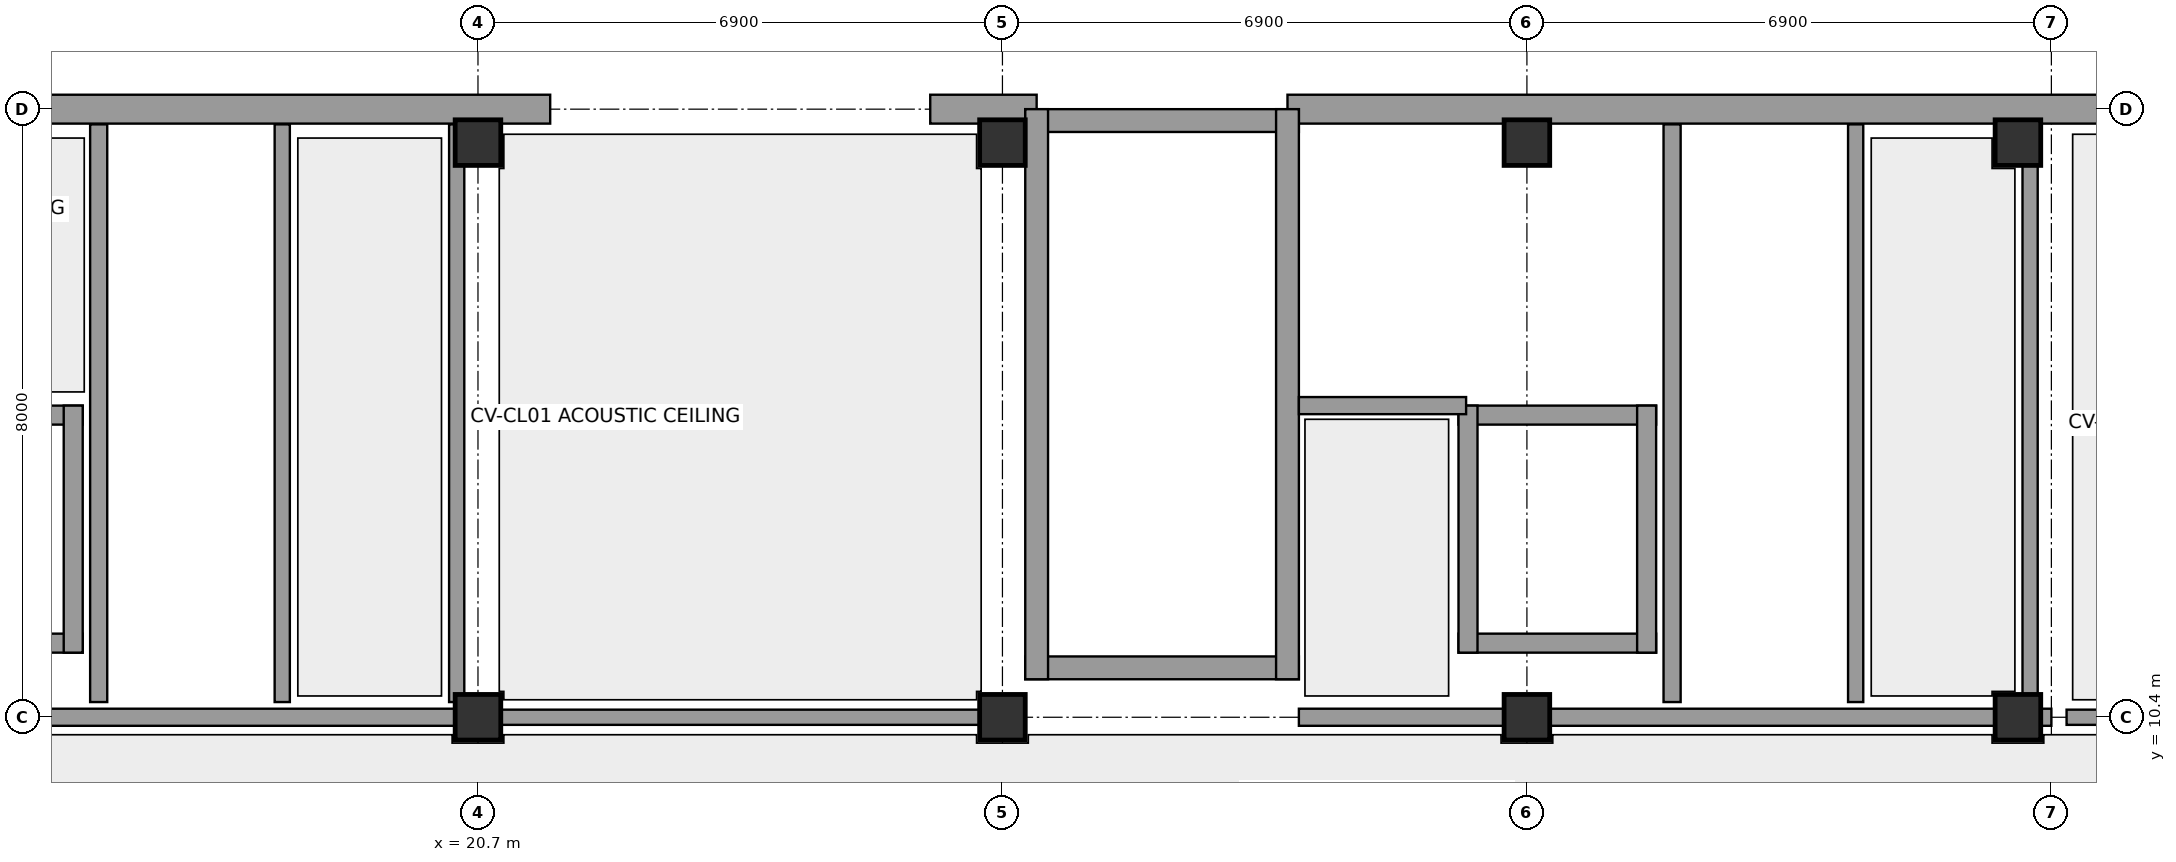
"""IFC4 building model, lengths in metres.
Left out: names, types, materials, properties, quantities, classifications, styles, units other than length and angle.
Written with IfcOpenShell. Run it as: python <this file> out.ifc"""

import sys

from ifc_helpers import new_model, si_unit, direction, frame, frame_2d, origin, origin_with_axes, origin_2d, place, context, subcontext, project, spatial, rectangle, extrude, element, fill, save


model = new_model("IFC4")
c1 = context("Model", 3, precision=1e-05, world=origin(), true_north=direction((0.0, 1.0)))
c2 = subcontext(c1, "Body", "Model", "MODEL_VIEW")
j1 = project(units=[si_unit("LENGTHUNIT", "METRE"), si_unit("PLANEANGLEUNIT", "RADIAN")], contexts=[c1])
p1 = place(None, origin())
s1 = spatial("IfcSite", under=j1, at=p1, CompositionType="ELEMENT")
p2 = place(p1, origin())
s2 = spatial("IfcBuilding", under=s1, at=p2, CompositionType="ELEMENT")
p3 = place(p2, origin())
s3 = spatial("IfcBuildingStorey", under=s2, at=p3, CompositionType="ELEMENT", Elevation=0.0)
for number, where, z_axis, x_axis in (
    (1, (20.7, 10.4, 0.0), (0.0, 0.0, 1.0), (1.0, 0.0, 0.0)),
    (2, (20.7, 17.96, 0.0), (0.0, 0.0, 1.0), (1.0, 0.0, 0.0)),
    (3, (27.6, 10.4, 0.0), (0.0, 0.0, 1.0), (1.0, 0.0, 0.0)),
    (4, (27.6, 17.96, 0.0), (0.0, 0.0, 1.0), (1.0, 0.0, 0.0)),
    (5, (34.5, 10.4, 0.0), (0.0, 0.0, 1.0), (1.0, 0.0, 0.0)),
    (6, (34.5, 17.96, 0.0), (0.0, 0.0, 1.0), (1.0, 0.0, 0.0)),
    (7, (40.96, 10.4, 0.0), (0.0, 0.0, 1.0), (1.0, 0.0, 0.0)),
    (8, (40.96, 17.96, 0.0), (0.0, 0.0, 1.0), (1.0, 0.0, 0.0)),
):
    element("IfcColumn", number, at=place(p3, frame(where, z_axis=z_axis, x_axis=x_axis)), inside=s3, PredefinedType="COLUMN", context=c2, shape_type="SweptSolid", body=[
        extrude(rectangle(XDim=0.6, YDim=0.6, at=origin_2d()), origin(), (0.0, 0.0, 1.0), 4.4),
    ])
p4 = place(p3, frame((10.65, 18.4, 0.0), z_axis=(0.0, 0.0, 1.0), x_axis=(1.0, 0.0, 0.0)))
e9 = element("IfcWall", 9, at=p4, inside=s3, PredefinedType="STANDARD", context=c2, shape_type="SweptSolid", body=[
    extrude(rectangle(XDim=11.0, YDim=0.38, at=frame_2d((5.5, 0.0))), origin(), (0.0, 0.0, 1.0), 4.12),
])
p5 = place(p3, frame((26.65, 18.4, 0.0), z_axis=(0.0, 0.0, 1.0), x_axis=(1.0, 0.0, 0.0)))
e10 = element("IfcWall", 10, at=p5, inside=s3, PredefinedType="STANDARD", context=c2, shape_type="SweptSolid", body=[
    extrude(rectangle(XDim=1.4, YDim=0.38, at=frame_2d((0.7, 0.0))), origin(), (0.0, 0.0, 1.0), 4.12),
])
p6 = place(p3, frame((31.35, 18.4, 0.0), z_axis=(0.0, 0.0, 1.0), x_axis=(1.0, 0.0, 0.0)))
e11 = element("IfcWall", 11, at=p6, inside=s3, PredefinedType="STANDARD", context=c2, shape_type="SweptSolid", body=[
    extrude(rectangle(XDim=11.0, YDim=0.38, at=frame_2d((5.5, 0.0))), origin(), (0.0, 0.0, 1.0), 4.12),
])
p7 = place(p3, frame((12.9, 14.375, 0.0), z_axis=(0.0, 0.0, 1.0), x_axis=(1.0, 0.0, 0.0)))
e12 = element("IfcWall", 12, at=p7, inside=s3, PredefinedType="SHEAR", context=c2, shape_type="SweptSolid", body=[
    extrude(rectangle(XDim=2.6, YDim=0.25, at=frame_2d((1.3, 0.0))), origin(), (0.0, 0.0, 1.0), 4.12),
])
p8 = place(p7, frame((0.875, 0.0, 0.0)))
e13 = element("IfcOpeningElement", 13, at=p8, cuts=e12, PredefinedType="OPENING", context=c2, shape_type="SweptSolid", body=[
    extrude(rectangle(XDim=1.1, YDim=2.1, at=frame_2d((0.55, 1.05))), frame((0.0, 0.137, 0.0), z_axis=(0.0, -1.0, 0.0), x_axis=(1.0, 0.0, 0.0)), (0.0, 0.0, 1.0), 0.274),
])
p9 = place(p3, frame((12.9, 11.375, 0.0), z_axis=(0.0, 0.0, 1.0), x_axis=(1.0, 0.0, 0.0)))
e14 = element("IfcWall", 14, at=p9, inside=s3, PredefinedType="SHEAR", context=c2, shape_type="SweptSolid", body=[
    extrude(rectangle(XDim=2.6, YDim=0.25, at=frame_2d((1.3, 0.0))), origin(), (0.0, 0.0, 1.0), 4.12),
])
p10 = place(p3, frame((15.375, 11.25, 0.0), z_axis=(0.0, 0.0, 1.0), x_axis=(0.0, 1.0, 0.0)))
e15 = element("IfcWall", 15, at=p10, inside=s3, PredefinedType="SHEAR", context=c2, shape_type="SweptSolid", body=[
    extrude(rectangle(XDim=3.25, YDim=0.25, at=frame_2d((1.625, 0.0))), origin(), (0.0, 0.0, 1.0), 4.12),
])
p11 = place(p3, frame((15.71, 10.6, 0.0), z_axis=(0.0, 0.0, 1.0), x_axis=(0.0, 1.0, 0.0)))
e16 = element("IfcWall", 16, at=p11, inside=s3, PredefinedType="PARTITIONING", context=c2, shape_type="SweptSolid", body=[
    extrude(rectangle(XDim=7.6, YDim=0.225, at=frame_2d((3.8, 0.0))), origin(), (0.0, 0.0, 1.0), 3.79),
])
p12 = place(p3, frame((18.125, 10.6, 0.0), z_axis=(0.0, 0.0, 1.0), x_axis=(0.0, 1.0, 0.0)))
e17 = element("IfcWall", 17, at=p12, inside=s3, PredefinedType="PARTITIONING", context=c2, shape_type="SweptSolid", body=[
    extrude(rectangle(XDim=7.6, YDim=0.2, at=frame_2d((3.8, 0.0))), origin(), (0.0, 0.0, 1.0), 3.79),
])
p13 = place(p3, frame((20.42, 10.6, 0.0), z_axis=(0.0, 0.0, 1.0), x_axis=(0.0, 1.0, 0.0)))
e18 = element("IfcWall", 18, at=p13, inside=s3, PredefinedType="PARTITIONING", context=c2, shape_type="SweptSolid", body=[
    extrude(rectangle(XDim=7.6, YDim=0.2, at=frame_2d((3.8, 0.0))), origin(), (0.0, 0.0, 1.0), 4.12),
])
p14 = place(p3, frame((10.8, 10.4, 0.0), z_axis=(0.0, 0.0, 1.0), x_axis=(1.0, 0.0, 0.0)))
e19 = element("IfcWall", 19, at=p14, inside=s3, PredefinedType="PARTITIONING", context=c2, shape_type="SweptSolid", body=[
    extrude(rectangle(XDim=9.9, YDim=0.225, at=frame_2d((4.95, 0.0))), origin(), (0.0, 0.0, 1.0), 3.56),
])
p15 = place(p14, frame((0.475, 0.0, 0.0)))
e20 = element("IfcOpeningElement", 20, at=p15, cuts=e19, PredefinedType="OPENING", context=c2, shape_type="SweptSolid", body=[
    extrude(rectangle(XDim=1.1, YDim=2.15, at=frame_2d((0.55, 1.075))), frame((0.0, 0.125, 0.0), z_axis=(0.0, -1.0, 0.0), x_axis=(1.0, 0.0, 0.0)), (0.0, 0.0, 1.0), 0.249),
])
p16 = place(p14, frame((5.75, 0.0, 0.0)))
e21 = element("IfcOpeningElement", 21, at=p16, cuts=e19, PredefinedType="OPENING", context=c2, shape_type="SweptSolid", body=[
    extrude(rectangle(XDim=0.9, YDim=2.1, at=frame_2d((0.45, 1.05))), frame((0.0, 0.125, 0.0), z_axis=(0.0, -1.0, 0.0), x_axis=(1.0, 0.0, 0.0)), (0.0, 0.0, 1.0), 0.249),
])
p17 = place(p14, frame((7.8, 0.0, 0.0)))
e22 = element("IfcOpeningElement", 22, at=p17, cuts=e19, PredefinedType="OPENING", context=c2, shape_type="SweptSolid", body=[
    extrude(rectangle(XDim=0.95, YDim=2.15, at=frame_2d((0.475, 1.075))), frame((0.0, 0.125, 0.0), z_axis=(0.0, -1.0, 0.0), x_axis=(1.0, 0.0, 0.0)), (0.0, 0.0, 1.0), 0.249),
])
p18 = place(p3, frame((27.9, 18.25, 0.0), z_axis=(0.0, 0.0, 1.0), x_axis=(1.0, 0.0, 0.0)))
e23 = element("IfcWall", 23, at=p18, inside=s3, PredefinedType="SHEAR", context=c2, shape_type="SweptSolid", body=[
    extrude(rectangle(XDim=3.6, YDim=0.3, at=frame_2d((1.8, 0.0))), origin(), (0.0, 0.0, 1.0), 4.12),
])
p19 = place(p18, frame((1.1, 0.0, 0.0)))
e24 = element("IfcOpeningElement", 24, at=p19, cuts=e23, PredefinedType="OPENING", context=c2, shape_type="SweptSolid", body=[
    extrude(rectangle(XDim=1.4, YDim=2.25, at=frame_2d((0.7, 1.125))), frame((0.0, 0.162, 0.0), z_axis=(0.0, -1.0, 0.0), x_axis=(1.0, 0.0, 0.0)), (0.0, 0.0, 1.0), 0.324),
])
p20 = place(p3, frame((27.9, 11.05, 0.0), z_axis=(0.0, 0.0, 1.0), x_axis=(1.0, 0.0, 0.0)))
e25 = element("IfcWall", 25, at=p20, inside=s3, PredefinedType="SHEAR", context=c2, shape_type="SweptSolid", body=[
    extrude(rectangle(XDim=3.6, YDim=0.3, at=frame_2d((1.8, 0.0))), origin(), (0.0, 0.0, 1.0), 4.12),
])
p21 = place(p3, frame((28.05, 10.9, 0.0), z_axis=(0.0, 0.0, 1.0), x_axis=(0.0, 1.0, 0.0)))
e26 = element("IfcWall", 26, at=p21, inside=s3, PredefinedType="SHEAR", context=c2, shape_type="SweptSolid", body=[
    extrude(rectangle(XDim=7.5, YDim=0.3, at=frame_2d((3.75, 0.0))), origin(), (0.0, 0.0, 1.0), 4.12),
])
p22 = place(p3, frame((31.35, 10.9, 0.0), z_axis=(0.0, 0.0, 1.0), x_axis=(0.0, 1.0, 0.0)))
e27 = element("IfcWall", 27, at=p22, inside=s3, PredefinedType="SHEAR", context=c2, shape_type="SweptSolid", body=[
    extrude(rectangle(XDim=7.5, YDim=0.3, at=frame_2d((3.75, 0.0))), origin(), (0.0, 0.0, 1.0), 4.12),
])
p23 = place(p22, frame((5.7, 0.0, 0.0)))
e28 = element("IfcOpeningElement", 28, at=p23, cuts=e27, PredefinedType="OPENING", context=c2, shape_type="SweptSolid", body=[
    extrude(rectangle(XDim=1.15, YDim=2.15, at=frame_2d((0.575, 1.075))), frame((0.0, 0.162, 0.0), z_axis=(0.0, -1.0, 0.0), x_axis=(1.0, 0.0, 0.0)), (0.0, 0.0, 1.0), 0.324),
])
p24 = place(p3, frame((33.6, 14.375, 0.0), z_axis=(0.0, 0.0, 1.0), x_axis=(1.0, 0.0, 0.0)))
e29 = element("IfcWall", 29, at=p24, inside=s3, PredefinedType="SHEAR", context=c2, shape_type="SweptSolid", body=[
    extrude(rectangle(XDim=2.6, YDim=0.25, at=frame_2d((1.3, 0.0))), origin(), (0.0, 0.0, 1.0), 4.12),
])
p25 = place(p24, frame((0.925, 0.0, 0.0)))
e30 = element("IfcOpeningElement", 30, at=p25, cuts=e29, PredefinedType="OPENING", context=c2, shape_type="SweptSolid", body=[
    extrude(rectangle(XDim=1.0, YDim=2.1, at=frame_2d((0.5, 1.05))), frame((0.0, 0.137, 0.0), z_axis=(0.0, -1.0, 0.0), x_axis=(1.0, 0.0, 0.0)), (0.0, 0.0, 1.0), 0.274),
])
p26 = place(p3, frame((33.6, 11.375, 0.0), z_axis=(0.0, 0.0, 1.0), x_axis=(1.0, 0.0, 0.0)))
e31 = element("IfcWall", 31, at=p26, inside=s3, PredefinedType="SHEAR", context=c2, shape_type="SweptSolid", body=[
    extrude(rectangle(XDim=2.6, YDim=0.25, at=frame_2d((1.3, 0.0))), origin(), (0.0, 0.0, 1.0), 4.12),
])
for number, where, z_axis, x_axis in (
    (32, (33.725, 11.25, 0.0), (0.0, 0.0, 1.0), (0.0, 1.0, 0.0)),
    (33, (36.075, 11.25, 0.0), (0.0, 0.0, 1.0), (0.0, 1.0, 0.0)),
):
    element("IfcWall", number, at=place(p3, frame(where, z_axis=z_axis, x_axis=x_axis)), inside=s3, PredefinedType="SHEAR", context=c2, shape_type="SweptSolid", body=[
        extrude(rectangle(XDim=3.25, YDim=0.25, at=frame_2d((1.625, 0.0))), origin(), (0.0, 0.0, 1.0), 4.12),
    ])
p27 = place(p3, frame((36.41, 10.6, 0.0), z_axis=(0.0, 0.0, 1.0), x_axis=(0.0, 1.0, 0.0)))
e34 = element("IfcWall", 34, at=p27, inside=s3, PredefinedType="PARTITIONING", context=c2, shape_type="SweptSolid", body=[
    extrude(rectangle(XDim=7.6, YDim=0.225, at=frame_2d((3.8, 0.0))), origin(), (0.0, 0.0, 1.0), 4.12),
])
p28 = place(p3, frame((31.5, 14.5, 0.0), z_axis=(0.0, 0.0, 1.0), x_axis=(1.0, 0.0, 0.0)))
e35 = element("IfcWall", 35, at=p28, inside=s3, PredefinedType="PARTITIONING", context=c2, shape_type="SweptSolid", body=[
    extrude(rectangle(XDim=2.2, YDim=0.225, at=frame_2d((1.1, 0.0))), origin(), (0.0, 0.0, 1.0), 4.12),
])
p29 = place(p28, frame((0.45, 0.0, 0.0)))
e36 = element("IfcOpeningElement", 36, at=p29, cuts=e35, PredefinedType="OPENING", context=c2, shape_type="SweptSolid", body=[
    extrude(rectangle(XDim=1.1, YDim=2.15, at=frame_2d((0.55, 1.075))), frame((0.0, 0.125, 0.0), z_axis=(0.0, -1.0, 0.0), x_axis=(1.0, 0.0, 0.0)), (0.0, 0.0, 1.0), 0.249),
])
p30 = place(p3, frame((27.6, 10.4, 0.0), z_axis=(0.0, 0.0, 1.0), x_axis=(1.0, 0.0, 0.0)))
e37 = element("IfcWall", 37, at=p30, inside=s3, PredefinedType="PARTITIONING", context=c2, shape_type="SweptSolid", body=[
    extrude(rectangle(XDim=0.3, YDim=0.225, at=frame_2d((0.15, 0.0))), origin(), (0.0, 0.0, 1.0), 4.12),
])
for number, where, z_axis, x_axis in (
    (38, (38.825, 10.6, 0.0), (0.0, 0.0, 1.0), (0.0, 1.0, 0.0)),
    (39, (41.12, 10.6, 0.0), (0.0, 0.0, 1.0), (0.0, 1.0, 0.0)),
):
    element("IfcWall", number, at=place(p3, frame(where, z_axis=z_axis, x_axis=x_axis)), inside=s3, PredefinedType="PARTITIONING", context=c2, shape_type="SweptSolid", body=[
        extrude(rectangle(XDim=7.6, YDim=0.2, at=frame_2d((3.8, 0.0))), origin(), (0.0, 0.0, 1.0), 4.12),
    ])
p31 = place(p3, frame((31.5, 10.4, 0.0), z_axis=(0.0, 0.0, 1.0), x_axis=(1.0, 0.0, 0.0)))
e40 = element("IfcWall", 40, at=p31, inside=s3, PredefinedType="PARTITIONING", context=c2, shape_type="SweptSolid", body=[
    extrude(rectangle(XDim=9.9, YDim=0.225, at=frame_2d((4.95, 0.0))), origin(), (0.0, 0.0, 1.0), 3.56),
])
p32 = place(p31, frame((0.475, 0.0, 0.0)))
e41 = element("IfcOpeningElement", 41, at=p32, cuts=e40, PredefinedType="OPENING", context=c2, shape_type="SweptSolid", body=[
    extrude(rectangle(XDim=1.1, YDim=2.15, at=frame_2d((0.55, 1.075))), frame((0.0, 0.125, 0.0), z_axis=(0.0, -1.0, 0.0), x_axis=(1.0, 0.0, 0.0)), (0.0, 0.0, 1.0), 0.249),
])
p33 = place(p31, frame((5.75, 0.0, 0.0)))
e42 = element("IfcOpeningElement", 42, at=p33, cuts=e40, PredefinedType="OPENING", context=c2, shape_type="SweptSolid", body=[
    extrude(rectangle(XDim=0.9, YDim=2.1, at=frame_2d((0.45, 1.05))), frame((0.0, 0.125, 0.0), z_axis=(0.0, -1.0, 0.0), x_axis=(1.0, 0.0, 0.0)), (0.0, 0.0, 1.0), 0.249),
])
p34 = place(p31, frame((7.8, 0.0, 0.0)))
e43 = element("IfcOpeningElement", 43, at=p34, cuts=e40, PredefinedType="OPENING", context=c2, shape_type="SweptSolid", body=[
    extrude(rectangle(XDim=0.95, YDim=2.15, at=frame_2d((0.475, 1.075))), frame((0.0, 0.125, 0.0), z_axis=(0.0, -1.0, 0.0), x_axis=(1.0, 0.0, 0.0)), (0.0, 0.0, 1.0), 0.249),
])
p35 = place(p3, frame((20.9, 10.4, 0.0), z_axis=(0.0, 0.0, 1.0), x_axis=(1.0, 0.0, 0.0)))
e44 = element("IfcWall", 44, at=p35, inside=s3, PredefinedType="PARTITIONING", context=c2, shape_type="SweptSolid", body=[
    extrude(rectangle(XDim=6.5, YDim=0.2, at=frame_2d((3.25, 0.0))), origin(), (0.0, 0.0, 1.0), 3.56),
])
p36 = place(p35, frame((1.9, 0.0, 0.0)))
e45 = element("IfcOpeningElement", 45, at=p36, cuts=e44, PredefinedType="OPENING", context=c2, shape_type="SweptSolid", body=[
    extrude(rectangle(XDim=0.95, YDim=2.15, at=frame_2d((0.475, 1.075))), frame((0.0, 0.112, 0.0), z_axis=(0.0, -1.0, 0.0), x_axis=(1.0, 0.0, 0.0)), (0.0, 0.0, 1.0), 0.224),
])
p37 = place(p3, frame((41.6, 10.4, 0.0), z_axis=(0.0, 0.0, 1.0), x_axis=(1.0, 0.0, 0.0)))
e46 = element("IfcWall", 46, at=p37, inside=s3, PredefinedType="PARTITIONING", context=c2, shape_type="SweptSolid", body=[
    extrude(rectangle(XDim=13.35, YDim=0.2, at=frame_2d((6.675, 0.0))), origin(), (0.0, 0.0, 1.0), 3.56),
])
p38 = place(p37, frame((1.9, 0.0, 0.0)))
e47 = element("IfcOpeningElement", 47, at=p38, cuts=e46, PredefinedType="OPENING", context=c2, shape_type="SweptSolid", body=[
    extrude(rectangle(XDim=0.95, YDim=2.15, at=frame_2d((0.475, 1.075))), frame((0.0, 0.112, 0.0), z_axis=(0.0, -1.0, 0.0), x_axis=(1.0, 0.0, 0.0)), (0.0, 0.0, 1.0), 0.224),
])
p39 = place(p16, frame((0.9, 0.0, 0.0), z_axis=(0.0, 0.0, 1.0), x_axis=(-1.0, 0.0, 0.0)))
e48 = element("IfcDoor", 48, at=p39, inside=s3, OperationType="SINGLE_SWING_LEFT", PredefinedType="DOOR", context=c2, shape_type="SweptSolid", body=[
    extrude(rectangle(XDim=0.9, YDim=2.1, at=frame_2d((0.45, 1.05))), frame((0.0, 0.025, 0.0), z_axis=(0.0, -1.0, 0.0), x_axis=(1.0, 0.0, 0.0)), (0.0, 0.0, 1.0), 0.05),
])
fill(e21, e48)
p40 = place(p17, frame((0.95, 0.0, 0.0), z_axis=(0.0, 0.0, 1.0), x_axis=(-1.0, 0.0, 0.0)))
e49 = element("IfcDoor", 49, at=p40, inside=s3, OperationType="SINGLE_SWING_RIGHT", PredefinedType="DOOR", context=c2, shape_type="SweptSolid", body=[
    extrude(rectangle(XDim=0.95, YDim=2.15, at=frame_2d((0.475, 1.075))), frame((0.0, 0.025, 0.0), z_axis=(0.0, -1.0, 0.0), x_axis=(1.0, 0.0, 0.0)), (0.0, 0.0, 1.0), 0.05),
])
fill(e22, e49)
p41 = place(p19, origin_with_axes())
e50 = element("IfcDoor", 50, at=p41, inside=s3, OperationType="DOUBLE_DOOR_SINGLE_SWING", PredefinedType="DOOR", context=c2, shape_type="SweptSolid", body=[
    extrude(rectangle(XDim=1.4, YDim=2.25, at=frame_2d((0.7, 1.125))), frame((0.0, 0.025, 0.0), z_axis=(0.0, -1.0, 0.0), x_axis=(1.0, 0.0, 0.0)), (0.0, 0.0, 1.0), 0.05),
])
fill(e24, e50)
p42 = place(p23, origin_with_axes())
e51 = element("IfcDoor", 51, at=p42, inside=s3, OperationType="SINGLE_SWING_LEFT", PredefinedType="DOOR", context=c2, shape_type="SweptSolid", body=[
    extrude(rectangle(XDim=1.15, YDim=2.15, at=frame_2d((0.575, 1.075))), frame((0.0, 0.025, 0.0), z_axis=(0.0, -1.0, 0.0), x_axis=(1.0, 0.0, 0.0)), (0.0, 0.0, 1.0), 0.05),
])
fill(e28, e51)
p43 = place(p25, origin_with_axes())
e52 = element("IfcDoor", 52, at=p43, inside=s3, OperationType="SLIDING_TO_LEFT", PredefinedType="DOOR", context=c2, shape_type="SweptSolid", body=[
    extrude(rectangle(XDim=1.0, YDim=2.1, at=frame_2d((0.5, 1.05))), frame((0.0, 0.025, 0.0), z_axis=(0.0, -1.0, 0.0), x_axis=(1.0, 0.0, 0.0)), (0.0, 0.0, 1.0), 0.05),
])
fill(e30, e52)
p44 = place(p29, origin_with_axes())
e53 = element("IfcDoor", 53, at=p44, inside=s3, OperationType="SINGLE_SWING_LEFT", PredefinedType="DOOR", context=c2, shape_type="SweptSolid", body=[
    extrude(rectangle(XDim=1.1, YDim=2.15, at=frame_2d((0.55, 1.075))), frame((0.0, 0.025, 0.0), z_axis=(0.0, -1.0, 0.0), x_axis=(1.0, 0.0, 0.0)), (0.0, 0.0, 1.0), 0.05),
])
fill(e36, e53)
p45 = place(p32, origin_with_axes())
e54 = element("IfcDoor", 54, at=p45, inside=s3, OperationType="SINGLE_SWING_RIGHT", PredefinedType="DOOR", context=c2, shape_type="SweptSolid", body=[
    extrude(rectangle(XDim=1.1, YDim=2.15, at=frame_2d((0.55, 1.075))), frame((0.0, 0.025, 0.0), z_axis=(0.0, -1.0, 0.0), x_axis=(1.0, 0.0, 0.0)), (0.0, 0.0, 1.0), 0.05),
])
fill(e41, e54)
p46 = place(p33, frame((0.9, 0.0, 0.0), z_axis=(0.0, 0.0, 1.0), x_axis=(-1.0, 0.0, 0.0)))
e55 = element("IfcDoor", 55, at=p46, inside=s3, OperationType="SINGLE_SWING_LEFT", PredefinedType="DOOR", context=c2, shape_type="SweptSolid", body=[
    extrude(rectangle(XDim=0.9, YDim=2.1, at=frame_2d((0.45, 1.05))), frame((0.0, 0.025, 0.0), z_axis=(0.0, -1.0, 0.0), x_axis=(1.0, 0.0, 0.0)), (0.0, 0.0, 1.0), 0.05),
])
fill(e42, e55)
p47 = place(p34, frame((0.95, 0.0, 0.0), z_axis=(0.0, 0.0, 1.0), x_axis=(-1.0, 0.0, 0.0)))
e56 = element("IfcDoor", 56, at=p47, inside=s3, OperationType="SINGLE_SWING_RIGHT", PredefinedType="DOOR", context=c2, shape_type="SweptSolid", body=[
    extrude(rectangle(XDim=0.95, YDim=2.15, at=frame_2d((0.475, 1.075))), frame((0.0, 0.025, 0.0), z_axis=(0.0, -1.0, 0.0), x_axis=(1.0, 0.0, 0.0)), (0.0, 0.0, 1.0), 0.05),
])
fill(e43, e56)
p48 = place(p36, frame((0.95, 0.0, 0.0), z_axis=(0.0, 0.0, 1.0), x_axis=(-1.0, 0.0, 0.0)))
e57 = element("IfcDoor", 57, at=p48, inside=s3, OperationType="SINGLE_SWING_LEFT", PredefinedType="DOOR", context=c2, shape_type="SweptSolid", body=[
    extrude(rectangle(XDim=0.95, YDim=2.15, at=frame_2d((0.475, 1.075))), frame((0.0, 0.025, 0.0), z_axis=(0.0, -1.0, 0.0), x_axis=(1.0, 0.0, 0.0)), (0.0, 0.0, 1.0), 0.05),
])
fill(e45, e57)
save(model, sys.argv[1])
